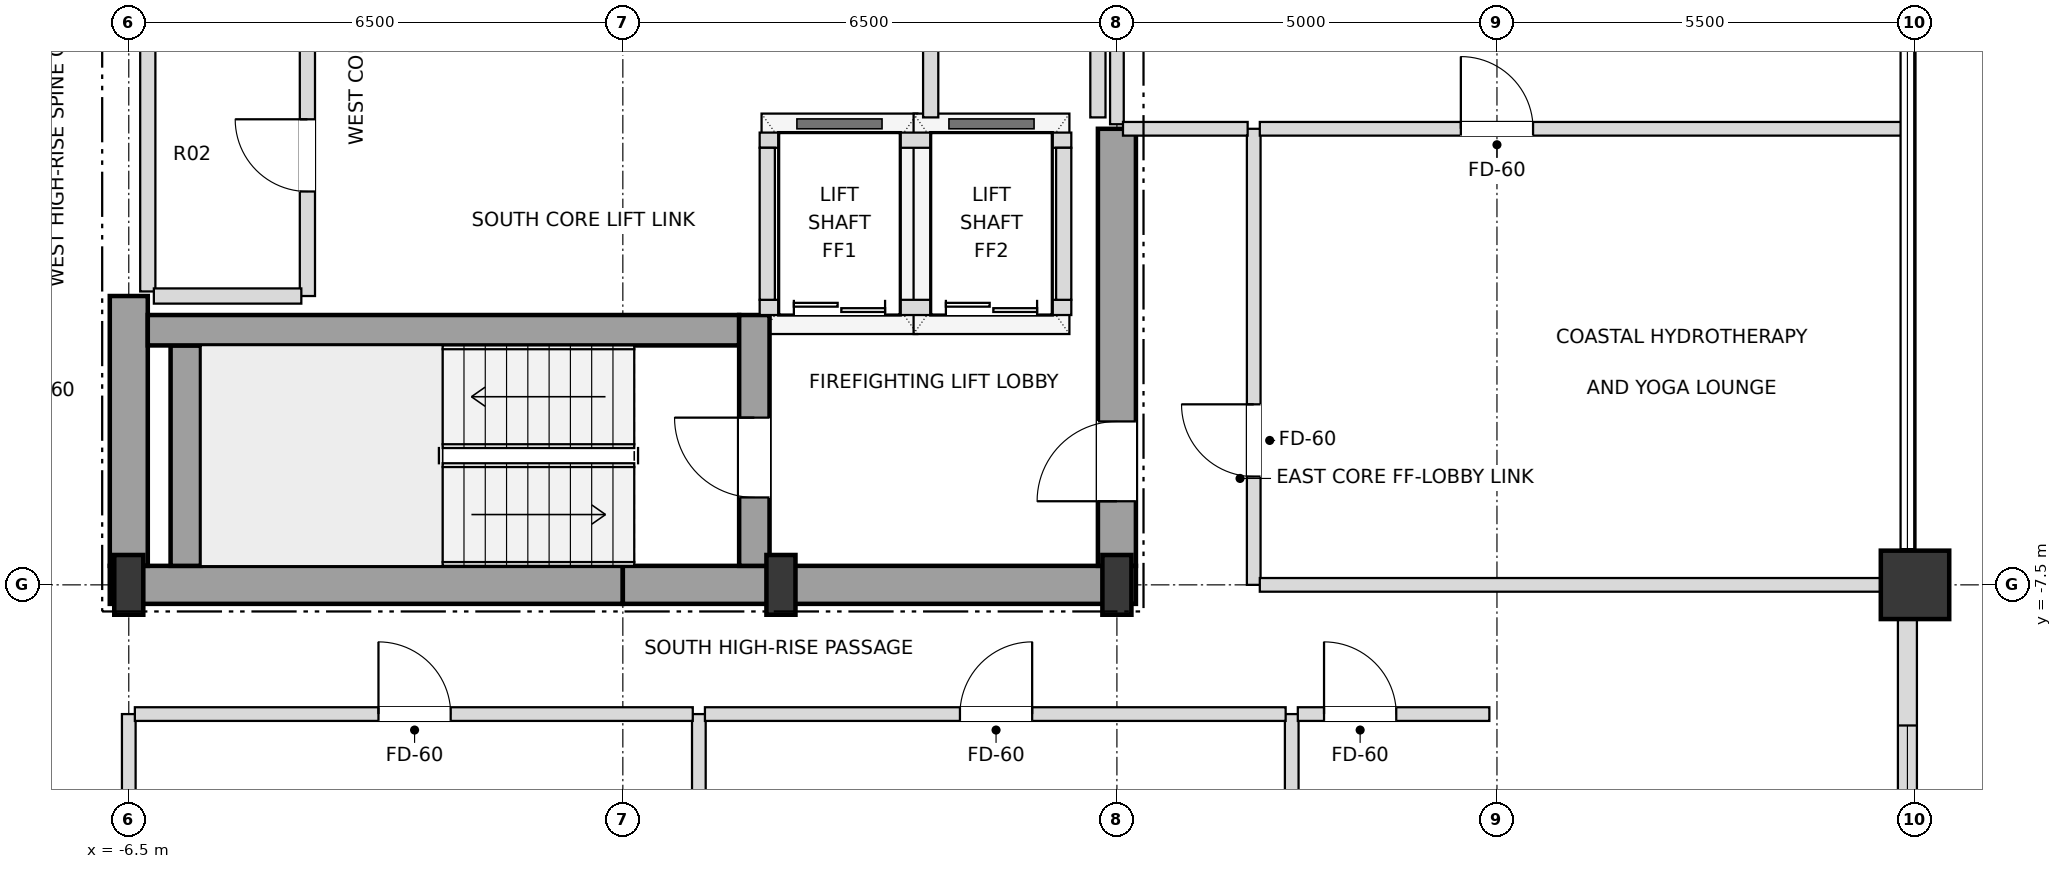
"""IFC4 building model, lengths in metres.
Left out: names, types, materials, properties, quantities, classifications, styles, units other than length and angle.
Written with IfcOpenShell. Run it as: python <this file> out.ifc"""

import sys

from ifc_helpers import new_model, si_unit, direction, frame, frame_2d, origin, origin_2d, place, context, subcontext, project, spatial, rectangle, i_section, extrude, element, fill, save


model = new_model("IFC4")
c1 = context("Model", 3, precision=1e-05, world=origin(), true_north=direction((0.0, 1.0)))
c2 = subcontext(c1, "Body", "Model", "MODEL_VIEW")
j1 = project(units=[si_unit("LENGTHUNIT", "METRE"), si_unit("PLANEANGLEUNIT", "RADIAN")], contexts=[c1])
p1 = place(None, origin())
s1 = spatial("IfcSite", under=j1, at=p1, CompositionType="ELEMENT")
p2 = place(p1, origin())
s2 = spatial("IfcBuilding", under=s1, at=p2, CompositionType="ELEMENT")
p3 = place(p2, frame((0.0, 0.0, 272.7)))
s3 = spatial("IfcBuildingStorey", under=s2, at=p3, CompositionType="ELEMENT", Elevation=272.7)
for number, where, z_axis, x_axis in (
    (1, (-6.5, -7.5, 0.0), (0.0, 0.0, 1.0), (1.0, 0.0, 0.0)),
    (2, (2.08, -7.5, 0.0), (0.0, 0.0, 1.0), (1.0, 0.0, 0.0)),
    (3, (6.5, -7.5, 0.0), (0.0, 0.0, 1.0), (1.0, 0.0, 0.0)),
):
    element("IfcColumn", number, at=place(p3, frame(where, z_axis=z_axis, x_axis=x_axis)), inside=s3, PredefinedType="COLUMN", context=c2, shape_type="SweptSolid", body=[
        extrude(i_section(OverallWidth=0.382, OverallDepth=0.786, WebThickness=0.02, FlangeThickness=0.033, at=origin_2d()), origin(), (0.0, 0.0, 1.0), 3.6),
    ])
p4 = place(p3, frame((17.0, -7.5, 0.0), z_axis=(0.0, 0.0, 1.0), x_axis=(1.0, 0.0, 0.0)))
e4 = element("IfcColumn", 4, at=p4, inside=s3, PredefinedType="USERDEFINED", context=c2, shape_type="SweptSolid", body=[
    extrude(rectangle(XDim=0.9, YDim=0.9, at=origin_2d()), origin(), (0.0, 0.0, 1.0), 3.6),
])
p5 = place(p3, frame((16.9, -12.555, 0.0), z_axis=(0.0, 0.0, 1.0), x_axis=(0.0, 1.0, 0.0)))
e5 = element("IfcWall", 5, at=p5, inside=s3, PredefinedType="SOLIDWALL", context=c2, shape_type="SweptSolid", body=[
    extrude(rectangle(XDim=4.61, YDim=0.25, at=frame_2d((2.305, 0.0))), origin(), (0.0, 0.0, 1.0), 2.748),
])
p6 = place(p5, frame((1.405, 0.0, 0.72)))
e6 = element("IfcOpeningElement", 6, at=p6, cuts=e5, PredefinedType="OPENING", context=c2, shape_type="SweptSolid", body=[
    extrude(rectangle(XDim=1.8, YDim=1.68, at=frame_2d((0.9, 0.84))), frame((0.0, 0.135, 0.0), z_axis=(0.0, -1.0, 0.0), x_axis=(1.0, 0.0, 0.0)), (0.0, 0.0, 1.0), 0.27),
])
for number, where, z_axis, x_axis in (
    (7, (-6.75, -7.5, 0.0), (0.0, 0.0, 1.0), (1.0, 0.0, 0.0)),
    (8, (0.0, -7.5, 0.0), (0.0, 0.0, 1.0), (1.0, 0.0, 0.0)),
):
    element("IfcWall", number, at=place(p3, frame(where, z_axis=z_axis, x_axis=x_axis)), inside=s3, PredefinedType="SHEAR", context=c2, shape_type="SweptSolid", body=[
        extrude(rectangle(XDim=6.75, YDim=0.5, at=frame_2d((3.375, 0.0))), origin(), (0.0, 0.0, 1.0), 3.38),
    ])
p7 = place(p3, frame((-6.5, -7.25, 0.0), z_axis=(0.0, 0.0, 1.0), x_axis=(0.0, 1.0, 0.0)))
e9 = element("IfcWall", 9, at=p7, inside=s3, PredefinedType="SHEAR", context=c2, shape_type="SweptSolid", body=[
    extrude(rectangle(XDim=3.55, YDim=0.5, at=frame_2d((1.775, 0.0))), origin(), (0.0, 0.0, 1.0), 3.38),
])
p8 = place(p3, frame((6.5, -7.25, 0.0), z_axis=(0.0, 0.0, 1.0), x_axis=(0.0, 1.0, 0.0)))
e10 = element("IfcWall", 10, at=p8, inside=s3, PredefinedType="SHEAR", context=c2, shape_type="SweptSolid", body=[
    extrude(rectangle(XDim=5.75, YDim=0.5, at=frame_2d((2.875, 0.0))), origin(), (0.0, 0.0, 1.0), 3.38),
])
p9 = place(p8, frame((0.85, 0.0, 0.0)))
e11 = element("IfcOpeningElement", 11, at=p9, cuts=e10, PredefinedType="OPENING", context=c2, shape_type="SweptSolid", body=[
    extrude(rectangle(XDim=1.05, YDim=2.15, at=frame_2d((0.525, 1.075))), frame((0.0, 0.26, 0.0), z_axis=(0.0, -1.0, 0.0), x_axis=(1.0, 0.0, 0.0)), (0.0, 0.0, 1.0), 0.52),
])
p10 = place(p3, frame((-5.75, -7.25, 0.0), z_axis=(0.0, 0.0, 1.0), x_axis=(0.0, 1.0, 0.0)))
e12 = element("IfcWall", 12, at=p10, inside=s3, PredefinedType="SHEAR", context=c2, shape_type="SweptSolid", body=[
    extrude(rectangle(XDim=2.9, YDim=0.4, at=frame_2d((1.45, 0.0))), origin(), (0.0, 0.0, 1.0), 3.38),
])
p11 = place(p3, frame((-6.25, -4.15, 0.0), z_axis=(0.0, 0.0, 1.0), x_axis=(1.0, 0.0, 0.0)))
e13 = element("IfcWall", 13, at=p11, inside=s3, PredefinedType="SHEAR", context=c2, shape_type="SweptSolid", body=[
    extrude(rectangle(XDim=7.78, YDim=0.4, at=frame_2d((3.89, 0.0))), origin(), (0.0, 0.0, 1.0), 3.38),
])
p12 = place(p3, frame((1.73, -7.25, 0.0), z_axis=(0.0, 0.0, 1.0), x_axis=(0.0, 1.0, 0.0)))
e14 = element("IfcWall", 14, at=p12, inside=s3, PredefinedType="SHEAR", context=c2, shape_type="SweptSolid", body=[
    extrude(rectangle(XDim=3.3, YDim=0.4, at=frame_2d((1.65, 0.0))), origin(), (0.0, 0.0, 1.0), 3.38),
])
p13 = place(p12, frame((0.9, 0.0, 0.0)))
e15 = element("IfcOpeningElement", 15, at=p13, cuts=e14, PredefinedType="OPENING", context=c2, shape_type="SweptSolid", body=[
    extrude(rectangle(XDim=1.05, YDim=2.15, at=frame_2d((0.525, 1.075))), frame((0.0, 0.21, 0.0), z_axis=(0.0, -1.0, 0.0), x_axis=(1.0, 0.0, 0.0)), (0.0, 0.0, 1.0), 0.42),
])
p14 = place(p3, frame((1.8, -3.85, 0.0), z_axis=(0.0, 0.0, 1.0), x_axis=(1.0, 0.0, 0.0)))
e16 = element("IfcWall", 16, at=p14, inside=s3, PredefinedType="SOLIDWALL", context=c2, shape_type="SweptSolid", body=[
    extrude(rectangle(XDim=4.1, YDim=0.2, at=frame_2d((2.05, 0.0))), origin(), (0.0, 0.0, 1.0), 3.38),
])
p15 = place(p14, frame((0.45, 0.0, 0.0)))
e17 = element("IfcOpeningElement", 17, at=p15, cuts=e16, PredefinedType="OPENING", context=c2, shape_type="SweptSolid", body=[
    extrude(rectangle(XDim=1.2, YDim=2.2, at=frame_2d((0.6, 1.1))), frame((0.0, 0.11, 0.0), z_axis=(0.0, -1.0, 0.0), x_axis=(1.0, 0.0, 0.0)), (0.0, 0.0, 1.0), 0.22),
])
p16 = place(p14, frame((2.45, 0.0, 0.0)))
e18 = element("IfcOpeningElement", 18, at=p16, cuts=e16, PredefinedType="OPENING", context=c2, shape_type="SweptSolid", body=[
    extrude(rectangle(XDim=1.2, YDim=2.2, at=frame_2d((0.6, 1.1))), frame((0.0, 0.11, 0.0), z_axis=(0.0, -1.0, 0.0), x_axis=(1.0, 0.0, 0.0)), (0.0, 0.0, 1.0), 0.22),
])
p17 = place(p3, frame((1.8, -1.65, 0.0), z_axis=(0.0, 0.0, 1.0), x_axis=(1.0, 0.0, 0.0)))
e19 = element("IfcWall", 19, at=p17, inside=s3, PredefinedType="SOLIDWALL", context=c2, shape_type="SweptSolid", body=[
    extrude(rectangle(XDim=4.1, YDim=0.2, at=frame_2d((2.05, 0.0))), origin(), (0.0, 0.0, 1.0), 3.38),
])
for number, where, z_axis, x_axis in (
    (20, (1.9, -3.75, 0.0), (0.0, 0.0, 1.0), (0.0, 1.0, 0.0)),
    (21, (5.8, -3.75, 0.0), (0.0, 0.0, 1.0), (0.0, 1.0, 0.0)),
):
    element("IfcWall", number, at=place(p3, frame(where, z_axis=z_axis, x_axis=x_axis)), inside=s3, PredefinedType="SOLIDWALL", context=c2, shape_type="SweptSolid", body=[
        extrude(rectangle(XDim=2.0, YDim=0.2, at=frame_2d((1.0, 0.0))), origin(), (0.0, 0.0, 1.0), 3.38),
    ])
p18 = place(p3, frame((-6.5, -19.9, 0.0), z_axis=(0.0, 0.0, 1.0), x_axis=(0.0, 1.0, 0.0)))
e22 = element("IfcWall", 22, at=p18, inside=s3, PredefinedType="PARTITIONING", context=c2, shape_type="SweptSolid", body=[
    extrude(rectangle(XDim=10.7, YDim=0.18, at=frame_2d((5.35, 0.0))), origin(), (0.0, 0.0, 1.0), 2.826),
])
p19 = place(p3, frame((-6.25, -3.64, 0.0), z_axis=(0.0, 0.0, 1.0), x_axis=(0.0, 1.0, 0.0)))
e23 = element("IfcWall", 23, at=p19, inside=s3, PredefinedType="SOLIDWALL", context=c2, shape_type="SweptSolid", body=[
    extrude(rectangle(XDim=7.34, YDim=0.2, at=frame_2d((3.67, 0.0))), origin(), (0.0, 0.0, 1.0), 3.38),
])
p20 = place(p3, frame((-4.15, -3.7, 0.0), z_axis=(0.0, 0.0, 1.0), x_axis=(0.0, 1.0, 0.0)))
e24 = element("IfcWall", 24, at=p20, inside=s3, PredefinedType="SOLIDWALL", context=c2, shape_type="SweptSolid", body=[
    extrude(rectangle(XDim=7.4, YDim=0.2, at=frame_2d((3.7, 0.0))), origin(), (0.0, 0.0, 1.0), 3.38),
])
p21 = place(p20, frame((1.375, 0.0, 0.0)))
e25 = element("IfcOpeningElement", 25, at=p21, cuts=e24, PredefinedType="OPENING", context=c2, shape_type="SweptSolid", body=[
    extrude(rectangle(XDim=0.95, YDim=2.15, at=frame_2d((0.475, 1.075))), frame((0.0, 0.11, 0.0), z_axis=(0.0, -1.0, 0.0), x_axis=(1.0, 0.0, 0.0)), (0.0, 0.0, 1.0), 0.22),
])
p22 = place(p20, frame((5.075, 0.0, 0.0)))
e26 = element("IfcOpeningElement", 26, at=p22, cuts=e24, PredefinedType="OPENING", context=c2, shape_type="SweptSolid", body=[
    extrude(rectangle(XDim=0.95, YDim=2.15, at=frame_2d((0.475, 1.075))), frame((0.0, 0.11, 0.0), z_axis=(0.0, -1.0, 0.0), x_axis=(1.0, 0.0, 0.0)), (0.0, 0.0, 1.0), 0.22),
])
p23 = place(p3, frame((1.0, -19.9, 0.0), z_axis=(0.0, 0.0, 1.0), x_axis=(0.0, 1.0, 0.0)))
e27 = element("IfcWall", 27, at=p23, inside=s3, PredefinedType="PARTITIONING", context=c2, shape_type="SweptSolid", body=[
    extrude(rectangle(XDim=10.7, YDim=0.18, at=frame_2d((5.35, 0.0))), origin(), (0.0, 0.0, 1.0), 3.018),
])
p24 = place(p3, frame((4.05, -1.35, 0.0), z_axis=(0.0, 0.0, 1.0), x_axis=(0.0, 1.0, 0.0)))
e28 = element("IfcWall", 28, at=p24, inside=s3, PredefinedType="SOLIDWALL", context=c2, shape_type="SweptSolid", body=[
    extrude(rectangle(XDim=5.15, YDim=0.2, at=frame_2d((2.575, 0.0))), origin(), (0.0, 0.0, 1.0), 3.38),
])
p25 = place(p24, frame((1.095, 0.0, 0.0)))
e29 = element("IfcOpeningElement", 29, at=p25, cuts=e28, PredefinedType="OPENING", context=c2, shape_type="SweptSolid", body=[
    extrude(rectangle(XDim=0.95, YDim=2.15, at=frame_2d((0.475, 1.075))), frame((0.0, 0.11, 0.0), z_axis=(0.0, -1.0, 0.0), x_axis=(1.0, 0.0, 0.0)), (0.0, 0.0, 1.0), 0.22),
])
p26 = place(p24, frame((3.675, 0.0, 0.0)))
e30 = element("IfcOpeningElement", 30, at=p26, cuts=e28, PredefinedType="OPENING", context=c2, shape_type="SweptSolid", body=[
    extrude(rectangle(XDim=0.95, YDim=2.15, at=frame_2d((0.475, 1.075))), frame((0.0, 0.11, 0.0), z_axis=(0.0, -1.0, 0.0), x_axis=(1.0, 0.0, 0.0)), (0.0, 0.0, 1.0), 0.22),
])
p27 = place(p3, frame((6.25, -1.35, 0.0), z_axis=(0.0, 0.0, 1.0), x_axis=(0.0, 1.0, 0.0)))
e31 = element("IfcWall", 31, at=p27, inside=s3, PredefinedType="SOLIDWALL", context=c2, shape_type="SweptSolid", body=[
    extrude(rectangle(XDim=5.15, YDim=0.2, at=frame_2d((2.575, 0.0))), origin(), (0.0, 0.0, 1.0), 3.38),
])
p28 = place(p3, frame((6.5, -1.44, 0.0), z_axis=(0.0, 0.0, 1.0), x_axis=(0.0, 1.0, 0.0)))
e32 = element("IfcWall", 32, at=p28, inside=s3, PredefinedType="PARTITIONING", context=c2, shape_type="SweptSolid", body=[
    extrude(rectangle(XDim=5.33, YDim=0.18, at=frame_2d((2.665, 0.0))), origin(), (0.0, 0.0, 1.0), 2.826),
])
p29 = place(p3, frame((8.3, -7.5, 0.0), z_axis=(0.0, 0.0, 1.0), x_axis=(0.0, 1.0, 0.0)))
e33 = element("IfcWall", 33, at=p29, inside=s3, PredefinedType="PARTITIONING", context=c2, shape_type="SweptSolid", body=[
    extrude(rectangle(XDim=6.0, YDim=0.18, at=frame_2d((3.0, 0.0))), origin(), (0.0, 0.0, 1.0), 3.38),
])
p30 = place(p29, frame((1.425, 0.0, 0.0)))
e34 = element("IfcOpeningElement", 34, at=p30, cuts=e33, PredefinedType="OPENING", context=c2, shape_type="SweptSolid", body=[
    extrude(rectangle(XDim=0.95, YDim=2.15, at=frame_2d((0.475, 1.075))), frame((0.0, 0.1, 0.0), z_axis=(0.0, -1.0, 0.0), x_axis=(1.0, 0.0, 0.0)), (0.0, 0.0, 1.0), 0.2),
])
p31 = place(p3, frame((8.8, -19.9, 0.0), z_axis=(0.0, 0.0, 1.0), x_axis=(0.0, 1.0, 0.0)))
e35 = element("IfcWall", 35, at=p31, inside=s3, PredefinedType="PARTITIONING", context=c2, shape_type="SweptSolid", body=[
    extrude(rectangle(XDim=10.7, YDim=0.18, at=frame_2d((5.35, 0.0))), origin(), (0.0, 0.0, 1.0), 2.826),
])
p32 = place(p3, frame((-6.42, -9.2, 0.0), z_axis=(0.0, 0.0, 1.0), x_axis=(1.0, 0.0, 0.0)))
e36 = element("IfcWall", 36, at=p32, inside=s3, PredefinedType="PARTITIONING", context=c2, shape_type="SweptSolid", body=[
    extrude(rectangle(XDim=7.34, YDim=0.18, at=frame_2d((3.67, 0.0))), origin(), (0.0, 0.0, 1.0), 3.38),
])
p33 = place(p32, frame((3.205, 0.0, 0.0)))
e37 = element("IfcOpeningElement", 37, at=p33, cuts=e36, PredefinedType="OPENING", context=c2, shape_type="SweptSolid", body=[
    extrude(rectangle(XDim=0.95, YDim=2.15, at=frame_2d((0.475, 1.075))), frame((0.0, 0.1, 0.0), z_axis=(0.0, -1.0, 0.0), x_axis=(1.0, 0.0, 0.0)), (0.0, 0.0, 1.0), 0.2),
])
p34 = place(p3, frame((1.08, -9.2, 0.0), z_axis=(0.0, 0.0, 1.0), x_axis=(1.0, 0.0, 0.0)))
e38 = element("IfcWall", 38, at=p34, inside=s3, PredefinedType="PARTITIONING", context=c2, shape_type="SweptSolid", body=[
    extrude(rectangle(XDim=7.64, YDim=0.18, at=frame_2d((3.82, 0.0))), origin(), (0.0, 0.0, 1.0), 2.826),
])
p35 = place(p34, frame((3.355, 0.0, 0.0)))
e39 = element("IfcOpeningElement", 39, at=p35, cuts=e38, PredefinedType="OPENING", context=c2, shape_type="SweptSolid", body=[
    extrude(rectangle(XDim=0.95, YDim=2.15, at=frame_2d((0.475, 1.075))), frame((0.0, 0.1, 0.0), z_axis=(0.0, -1.0, 0.0), x_axis=(1.0, 0.0, 0.0)), (0.0, 0.0, 1.0), 0.2),
])
p36 = place(p3, frame((8.88, -9.2, 0.0), z_axis=(0.0, 0.0, 1.0), x_axis=(1.0, 0.0, 0.0)))
e40 = element("IfcWall", 40, at=p36, inside=s3, PredefinedType="PARTITIONING", context=c2, shape_type="SweptSolid", body=[
    extrude(rectangle(XDim=2.52, YDim=0.18, at=frame_2d((1.26, 0.0))), origin(), (0.0, 0.0, 1.0), 3.38),
])
p37 = place(p36, frame((0.345, 0.0, 0.0)))
e41 = element("IfcOpeningElement", 41, at=p37, cuts=e40, PredefinedType="OPENING", context=c2, shape_type="SweptSolid", body=[
    extrude(rectangle(XDim=0.95, YDim=2.15, at=frame_2d((0.475, 1.075))), frame((0.0, 0.1, 0.0), z_axis=(0.0, -1.0, 0.0), x_axis=(1.0, 0.0, 0.0)), (0.0, 0.0, 1.0), 0.2),
])
p38 = place(p3, frame((8.38, -7.5, 0.0), z_axis=(0.0, 0.0, 1.0), x_axis=(1.0, 0.0, 0.0)))
e42 = element("IfcWall", 42, at=p38, inside=s3, PredefinedType="PARTITIONING", context=c2, shape_type="SweptSolid", body=[
    extrude(rectangle(XDim=8.52, YDim=0.18, at=frame_2d((4.26, 0.0))), origin(), (0.0, 0.0, 1.0), 2.826),
])
p39 = place(p3, frame((-6.17, -3.7, 0.0), z_axis=(0.0, 0.0, 1.0), x_axis=(1.0, 0.0, 0.0)))
e43 = element("IfcWall", 43, at=p39, inside=s3, PredefinedType="SOLIDWALL", context=c2, shape_type="SweptSolid", body=[
    extrude(rectangle(XDim=1.94, YDim=0.2, at=frame_2d((0.97, 0.0))), origin(), (0.0, 0.0, 1.0), 3.38),
])
p40 = place(p3, frame((6.58, -1.5, 0.0), z_axis=(0.0, 0.0, 1.0), x_axis=(1.0, 0.0, 0.0)))
e44 = element("IfcWall", 44, at=p40, inside=s3, PredefinedType="PARTITIONING", context=c2, shape_type="SweptSolid", body=[
    extrude(rectangle(XDim=1.64, YDim=0.18, at=frame_2d((0.82, 0.0))), origin(), (0.0, 0.0, 1.0), 3.38),
])
p41 = place(p3, frame((8.38, -1.5, 0.0), z_axis=(0.0, 0.0, 1.0), x_axis=(1.0, 0.0, 0.0)))
e45 = element("IfcWall", 45, at=p41, inside=s3, PredefinedType="PARTITIONING", context=c2, shape_type="SweptSolid", body=[
    extrude(rectangle(XDim=8.44, YDim=0.18, at=frame_2d((4.22, 0.0))), origin(), (0.0, 0.0, 1.0), 3.018),
])
p42 = place(p41, frame((2.645, 0.0, 0.0)))
e46 = element("IfcOpeningElement", 46, at=p42, cuts=e45, PredefinedType="OPENING", context=c2, shape_type="SweptSolid", body=[
    extrude(rectangle(XDim=0.95, YDim=2.15, at=frame_2d((0.475, 1.075))), frame((0.0, 0.1, 0.0), z_axis=(0.0, -1.0, 0.0), x_axis=(1.0, 0.0, 0.0)), (0.0, 0.0, 1.0), 0.2),
])
p43 = place(p6, origin())
e47 = element("IfcWindow", 47, at=p43, inside=s3, PartitioningType="SINGLE_PANEL", PredefinedType="WINDOW", context=c2, shape_type="SweptSolid", body=[
    extrude(rectangle(XDim=1.8, YDim=1.68, at=frame_2d((0.9, 0.84))), frame((0.0, 0.03, 0.0), z_axis=(0.0, -1.0, 0.0), x_axis=(1.0, 0.0, 0.0)), (0.0, 0.0, 1.0), 0.06),
])
fill(e6, e47)
p44 = place(p9, origin())
e48 = element("IfcDoor", 48, at=p44, inside=s3, OperationType="SINGLE_SWING_LEFT", PredefinedType="DOOR", context=c2, shape_type="SweptSolid", body=[
    extrude(rectangle(XDim=1.05, YDim=2.15, at=frame_2d((0.525, 1.075))), frame((0.0, 0.025, 0.0), z_axis=(0.0, -1.0, 0.0), x_axis=(1.0, 0.0, 0.0)), (0.0, 0.0, 1.0), 0.05),
])
fill(e11, e48)
p45 = place(p13, origin())
e49 = element("IfcDoor", 49, at=p45, inside=s3, OperationType="SINGLE_SWING_RIGHT", PredefinedType="DOOR", context=c2, shape_type="SweptSolid", body=[
    extrude(rectangle(XDim=1.05, YDim=2.15, at=frame_2d((0.525, 1.075))), frame((0.0, 0.025, 0.0), z_axis=(0.0, -1.0, 0.0), x_axis=(1.0, 0.0, 0.0)), (0.0, 0.0, 1.0), 0.05),
])
fill(e15, e49)
p46 = place(p15, origin())
e50 = element("IfcDoor", 50, at=p46, inside=s3, OperationType="DOUBLE_DOOR_SLIDING", PredefinedType="DOOR", context=c2, shape_type="SweptSolid", body=[
    extrude(rectangle(XDim=1.2, YDim=2.2, at=frame_2d((0.6, 1.1))), frame((0.0, 0.025, 0.0), z_axis=(0.0, -1.0, 0.0), x_axis=(1.0, 0.0, 0.0)), (0.0, 0.0, 1.0), 0.05),
])
fill(e17, e50)
p47 = place(p16, origin())
e51 = element("IfcDoor", 51, at=p47, inside=s3, OperationType="DOUBLE_DOOR_SLIDING", PredefinedType="DOOR", context=c2, shape_type="SweptSolid", body=[
    extrude(rectangle(XDim=1.2, YDim=2.2, at=frame_2d((0.6, 1.1))), frame((0.0, 0.025, 0.0), z_axis=(0.0, -1.0, 0.0), x_axis=(1.0, 0.0, 0.0)), (0.0, 0.0, 1.0), 0.05),
])
fill(e18, e51)
p48 = place(p21, origin())
e52 = element("IfcDoor", 52, at=p48, inside=s3, OperationType="SINGLE_SWING_RIGHT", PredefinedType="DOOR", context=c2, shape_type="SweptSolid", body=[
    extrude(rectangle(XDim=0.95, YDim=2.15, at=frame_2d((0.475, 1.075))), frame((0.0, 0.025, 0.0), z_axis=(0.0, -1.0, 0.0), x_axis=(1.0, 0.0, 0.0)), (0.0, 0.0, 1.0), 0.05),
])
fill(e25, e52)
p49 = place(p33, origin())
e53 = element("IfcDoor", 53, at=p49, inside=s3, OperationType="SINGLE_SWING_LEFT", PredefinedType="DOOR", context=c2, shape_type="SweptSolid", body=[
    extrude(rectangle(XDim=0.95, YDim=2.15, at=frame_2d((0.475, 1.075))), frame((0.0, 0.025, 0.0), z_axis=(0.0, -1.0, 0.0), x_axis=(1.0, 0.0, 0.0)), (0.0, 0.0, 1.0), 0.05),
])
fill(e37, e53)
p50 = place(p35, origin())
e54 = element("IfcDoor", 54, at=p50, inside=s3, OperationType="SINGLE_SWING_RIGHT", PredefinedType="DOOR", context=c2, shape_type="SweptSolid", body=[
    extrude(rectangle(XDim=0.95, YDim=2.15, at=frame_2d((0.475, 1.075))), frame((0.0, 0.025, 0.0), z_axis=(0.0, -1.0, 0.0), x_axis=(1.0, 0.0, 0.0)), (0.0, 0.0, 1.0), 0.05),
])
fill(e39, e54)
p51 = place(p37, origin())
e55 = element("IfcDoor", 55, at=p51, inside=s3, OperationType="SINGLE_SWING_LEFT", PredefinedType="DOOR", context=c2, shape_type="SweptSolid", body=[
    extrude(rectangle(XDim=0.95, YDim=2.15, at=frame_2d((0.475, 1.075))), frame((0.0, 0.025, 0.0), z_axis=(0.0, -1.0, 0.0), x_axis=(1.0, 0.0, 0.0)), (0.0, 0.0, 1.0), 0.05),
])
fill(e41, e55)
p52 = place(p30, origin())
e56 = element("IfcDoor", 56, at=p52, inside=s3, OperationType="SINGLE_SWING_RIGHT", PredefinedType="DOOR", context=c2, shape_type="SweptSolid", body=[
    extrude(rectangle(XDim=0.95, YDim=2.15, at=frame_2d((0.475, 1.075))), frame((0.0, 0.025, 0.0), z_axis=(0.0, -1.0, 0.0), x_axis=(1.0, 0.0, 0.0)), (0.0, 0.0, 1.0), 0.05),
])
fill(e34, e56)
p53 = place(p42, origin())
e57 = element("IfcDoor", 57, at=p53, inside=s3, OperationType="SINGLE_SWING_LEFT", PredefinedType="DOOR", context=c2, shape_type="SweptSolid", body=[
    extrude(rectangle(XDim=0.95, YDim=2.15, at=frame_2d((0.475, 1.075))), frame((0.0, 0.025, 0.0), z_axis=(0.0, -1.0, 0.0), x_axis=(1.0, 0.0, 0.0)), (0.0, 0.0, 1.0), 0.05),
])
fill(e46, e57)
save(model, sys.argv[1])
